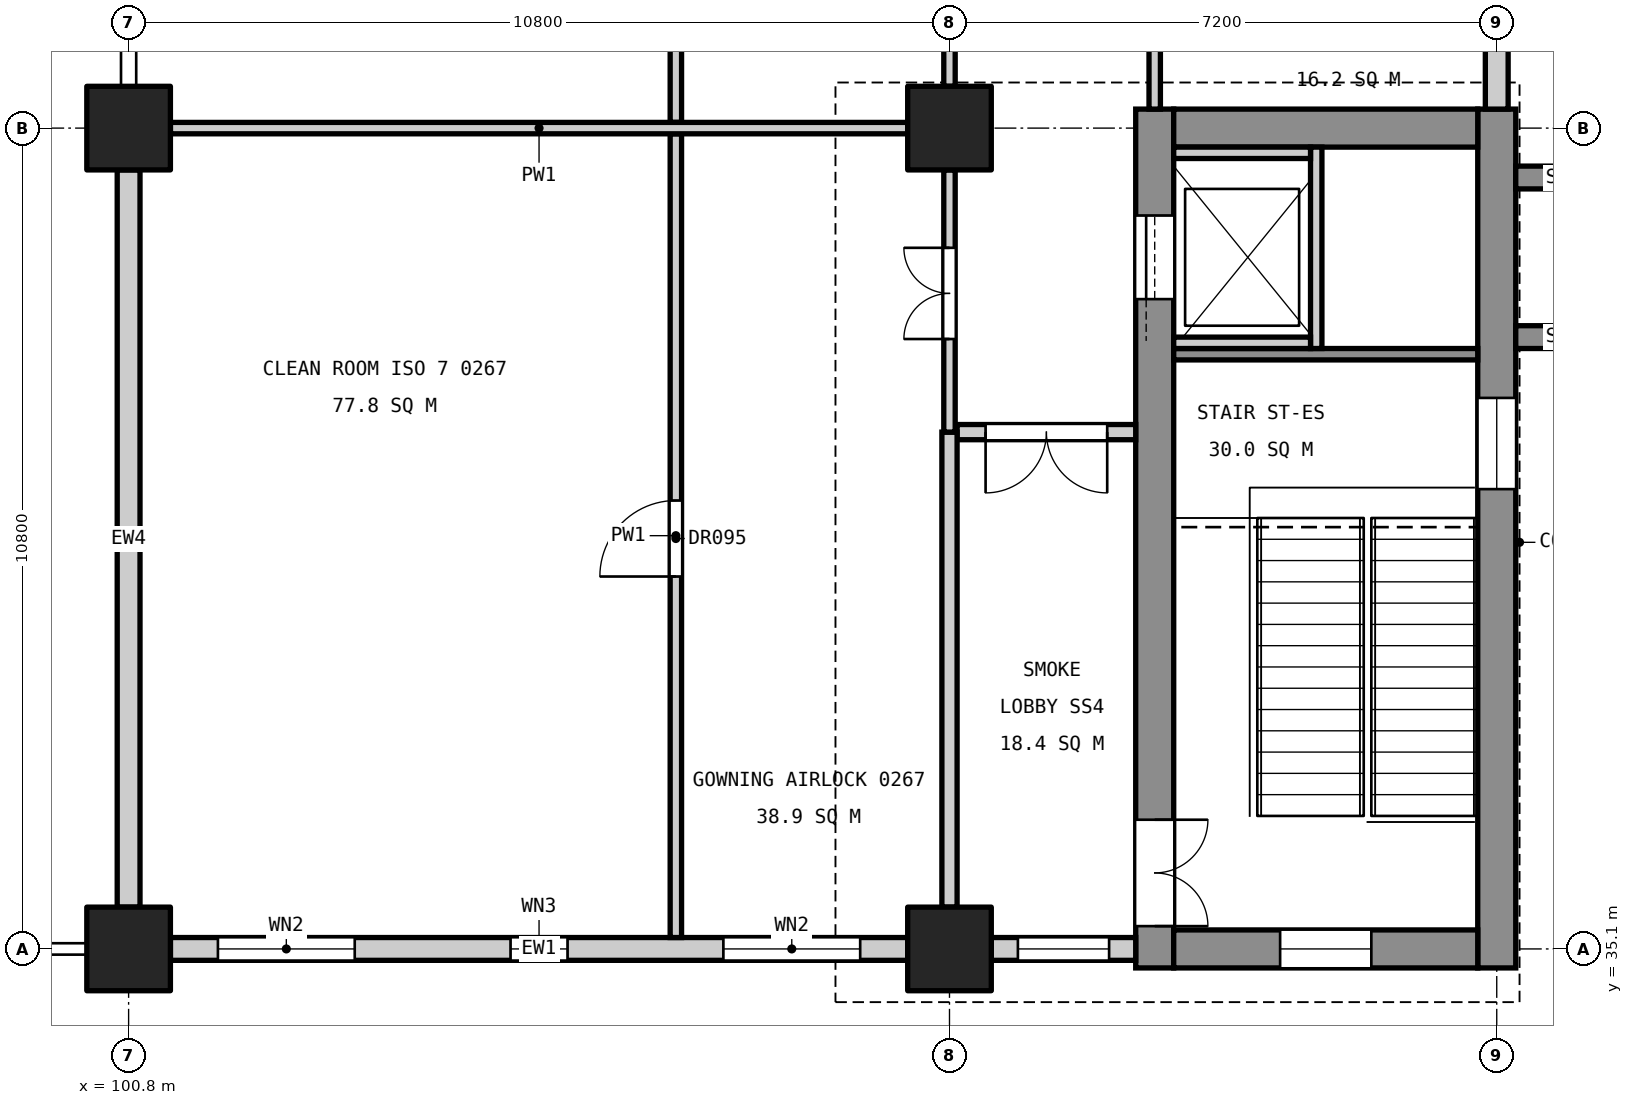
"""IFC4 building model, lengths in metres.
Left out: names, types, materials, properties, quantities, classifications, styles, units other than length and angle.
Written with IfcOpenShell. Run it as: python <this file> out.ifc"""

import sys

from ifc_helpers import new_model, si_unit, direction, frame, frame_2d, origin, origin_2d, place, context, subcontext, project, spatial, rectangle, extrude, element, fill, save


model = new_model("IFC4")
c1 = context("Model", 3, precision=1e-05, world=origin(), true_north=direction((0.0, 1.0)))
c2 = subcontext(c1, "Body", "Model", "MODEL_VIEW")
j1 = project(units=[si_unit("LENGTHUNIT", "METRE"), si_unit("PLANEANGLEUNIT", "RADIAN")], contexts=[c1])
p1 = place(None, origin())
s1 = spatial("IfcSite", under=j1, at=p1, CompositionType="ELEMENT")
p2 = place(p1, origin())
s2 = spatial("IfcBuilding", under=s1, at=p2, CompositionType="ELEMENT")
p3 = place(p2, frame((0.0, 0.0, 11.4)))
s3 = spatial("IfcBuildingStorey", under=s2, at=p3, CompositionType="ELEMENT", Elevation=11.4)
for number, where, z_axis, x_axis in (
    (1, (111.6, 35.1, 0.0), (0.0, 0.0, 1.0), (1.0, 0.0, 0.0)),
    (2, (111.6, 45.9, 0.0), (0.0, 0.0, 1.0), (1.0, 0.0, 0.0)),
    (3, (100.8, 35.1, 0.0), (0.0, 0.0, 1.0), (1.0, 0.0, 0.0)),
    (4, (100.8, 45.9, 0.0), (0.0, 0.0, 1.0), (1.0, 0.0, 0.0)),
):
    element("IfcColumn", number, at=place(p3, frame(where, z_axis=z_axis, x_axis=x_axis)), inside=s3, PredefinedType="COLUMN", context=c2, shape_type="SweptSolid", body=[
        extrude(rectangle(XDim=1.1, YDim=1.1, at=origin_2d()), origin(), (0.0, 0.0, 1.0), 5.4),
    ])
p4 = place(p3, frame((118.8, 34.85, 0.0), z_axis=(0.0, 0.0, 1.0), x_axis=(0.0, 1.0, 0.0)))
e5 = element("IfcWall", 5, at=p4, inside=s3, PredefinedType="SHEAR", context=c2, shape_type="SweptSolid", body=[
    extrude(rectangle(XDim=11.3, YDim=0.5, at=frame_2d((5.65, 0.0))), origin(), (0.0, 0.0, 1.0), 5.1),
])
p5 = place(p4, frame((6.3, 0.0, 3.4)))
e6 = element("IfcOpeningElement", 6, at=p5, cuts=e5, PredefinedType="OPENING", context=c2, shape_type="SweptSolid", body=[
    extrude(rectangle(XDim=1.2, YDim=0.9, at=frame_2d((0.6, 0.45))), frame((0.0, 0.26, 0.0), z_axis=(0.0, -1.0, 0.0), x_axis=(1.0, 0.0, 0.0)), (0.0, 0.0, 1.0), 0.52),
])
p6 = place(p3, frame((114.3, 34.85, 0.0), z_axis=(0.0, 0.0, 1.0), x_axis=(0.0, 1.0, 0.0)))
e7 = element("IfcWall", 7, at=p6, inside=s3, PredefinedType="SHEAR", context=c2, shape_type="SweptSolid", body=[
    extrude(rectangle(XDim=11.3, YDim=0.5, at=frame_2d((5.65, 0.0))), origin(), (0.0, 0.0, 1.0), 5.1),
])
p7 = place(p6, frame((0.55, 0.0, 0.0)))
e8 = element("IfcOpeningElement", 8, at=p7, cuts=e7, PredefinedType="OPENING", context=c2, shape_type="SweptSolid", body=[
    extrude(rectangle(XDim=1.4, YDim=2.1, at=frame_2d((0.7, 1.05))), frame((0.0, 0.26, 0.0), z_axis=(0.0, -1.0, 0.0), x_axis=(1.0, 0.0, 0.0)), (0.0, 0.0, 1.0), 0.52),
])
p8 = place(p6, frame((8.8, 0.0, 0.0)))
e9 = element("IfcOpeningElement", 9, at=p8, cuts=e7, PredefinedType="OPENING", context=c2, shape_type="SweptSolid", body=[
    extrude(rectangle(XDim=1.1, YDim=2.1, at=frame_2d((0.55, 1.05))), frame((0.0, 0.26, 0.0), z_axis=(0.0, -1.0, 0.0), x_axis=(1.0, 0.0, 0.0)), (0.0, 0.0, 1.0), 0.52),
])
p9 = place(p3, frame((118.55, 35.1, 0.0), z_axis=(0.0, 0.0, 1.0), x_axis=(-1.0, 0.0, 0.0)))
e10 = element("IfcWall", 10, at=p9, inside=s3, PredefinedType="SHEAR", context=c2, shape_type="SweptSolid", body=[
    extrude(rectangle(XDim=4.0, YDim=0.5, at=frame_2d((2.0, 0.0))), origin(), (0.0, 0.0, 1.0), 5.1),
])
p10 = place(p9, frame((1.4, 0.0, 3.4)))
e11 = element("IfcOpeningElement", 11, at=p10, cuts=e10, PredefinedType="OPENING", context=c2, shape_type="SweptSolid", body=[
    extrude(rectangle(XDim=1.2, YDim=0.9, at=frame_2d((0.6, 0.45))), frame((0.0, 0.26, 0.0), z_axis=(0.0, -1.0, 0.0), x_axis=(1.0, 0.0, 0.0)), (0.0, 0.0, 1.0), 0.52),
])
p11 = place(p3, frame((118.55, 45.9, 0.0), z_axis=(0.0, 0.0, 1.0), x_axis=(-1.0, 0.0, 0.0)))
e12 = element("IfcWall", 12, at=p11, inside=s3, PredefinedType="SHEAR", context=c2, shape_type="SweptSolid", body=[
    extrude(rectangle(XDim=4.0, YDim=0.5, at=frame_2d((2.0, 0.0))), origin(), (0.0, 0.0, 1.0), 5.1),
])
for number, where, z_axis, x_axis in (
    (13, (119.05, 43.15, 0.0), (0.0, 0.0, 1.0), (1.0, 0.0, 0.0)),
    (14, (119.05, 45.25, 0.0), (0.0, 0.0, 1.0), (1.0, 0.0, 0.0)),
):
    element("IfcWall", number, at=place(p3, frame(where, z_axis=z_axis, x_axis=x_axis)), inside=s3, PredefinedType="SHEAR", context=c2, shape_type="SweptSolid", body=[
        extrude(rectangle(XDim=1.25, YDim=0.3, at=frame_2d((0.625, 0.0))), origin(), (0.0, 0.0, 1.0), 5.4),
    ])
p12 = place(p3, frame((118.55, 42.925, 0.0), z_axis=(0.0, 0.0, 1.0), x_axis=(-1.0, 0.0, 0.0)))
e15 = element("IfcWall", 15, at=p12, inside=s3, PredefinedType="SOLIDWALL", context=c2, shape_type="SweptSolid", body=[
    extrude(rectangle(XDim=4.0, YDim=0.15, at=frame_2d((2.0, 0.0))), origin(), (0.0, 0.0, 1.0), 5.1),
])
p13 = place(p3, frame((116.425, 43.0, 0.0), z_axis=(0.0, 0.0, 1.0), x_axis=(0.0, 1.0, 0.0)))
e16 = element("IfcWall", 16, at=p13, inside=s3, PredefinedType="SOLIDWALL", context=c2, shape_type="SweptSolid", body=[
    extrude(rectangle(XDim=2.65, YDim=0.15, at=frame_2d((1.325, 0.0))), origin(), (0.0, 0.0, 1.0), 5.4),
])
for number, where, z_axis, x_axis in (
    (17, (116.35, 43.075, 0.0), (0.0, 0.0, 1.0), (-1.0, 0.0, 0.0)),
    (18, (116.35, 45.575, 0.0), (0.0, 0.0, 1.0), (-1.0, 0.0, 0.0)),
):
    element("IfcWall", number, at=place(p3, frame(where, z_axis=z_axis, x_axis=x_axis)), inside=s3, PredefinedType="SOLIDWALL", context=c2, shape_type="SweptSolid", body=[
        extrude(rectangle(XDim=1.8, YDim=0.15, at=frame_2d((0.9, 0.0))), origin(), (0.0, 0.0, 1.0), 5.4),
    ])
p14 = place(p3, frame((118.8, 46.15, 0.0), z_axis=(0.0, 0.0, 1.0), x_axis=(0.0, 1.0, 0.0)))
e19 = element("IfcWall", 19, at=p14, inside=s3, PredefinedType="STANDARD", context=c2, shape_type="SweptSolid", body=[
    extrude(rectangle(XDim=10.0, YDim=0.3, at=frame_2d((5.0, 0.0))), origin(), (0.0, 0.0, 1.0), 4.1),
])
p15 = place(p14, frame((1.3, 0.0, 0.8)))
e20 = element("IfcOpeningElement", 20, at=p15, cuts=e19, PredefinedType="OPENING", context=c2, shape_type="SweptSolid", body=[
    extrude(rectangle(XDim=0.75, YDim=1.2, at=frame_2d((0.375, 0.6))), frame((0.0, 0.16, 0.0), z_axis=(0.0, -1.0, 0.0), x_axis=(1.0, 0.0, 0.0)), (0.0, 0.0, 1.0), 0.32),
])
p16 = place(p14, frame((4.25, 0.0, 0.9)))
e21 = element("IfcOpeningElement", 21, at=p16, cuts=e19, PredefinedType="OPENING", context=c2, shape_type="SweptSolid", body=[
    extrude(rectangle(XDim=1.8, YDim=3.0, at=frame_2d((0.9, 1.5))), frame((0.0, 0.16, 0.0), z_axis=(0.0, -1.0, 0.0), x_axis=(1.0, 0.0, 0.0)), (0.0, 0.0, 1.0), 0.32),
])
p17 = place(p14, frame((7.575, 0.0, 0.9)))
e22 = element("IfcOpeningElement", 22, at=p17, cuts=e19, PredefinedType="OPENING", context=c2, shape_type="SweptSolid", body=[
    extrude(rectangle(XDim=1.8, YDim=3.0, at=frame_2d((0.9, 1.5))), frame((0.0, 0.16, 0.0), z_axis=(0.0, -1.0, 0.0), x_axis=(1.0, 0.0, 0.0)), (0.0, 0.0, 1.0), 0.32),
])
p18 = place(p3, frame((114.05, 35.1, 0.0), z_axis=(0.0, 0.0, 1.0), x_axis=(-1.0, 0.0, 0.0)))
e23 = element("IfcWall", 23, at=p18, inside=s3, PredefinedType="STANDARD", context=c2, shape_type="SweptSolid", body=[
    extrude(rectangle(XDim=1.9, YDim=0.3, at=frame_2d((0.95, 0.0))), origin(), (0.0, 0.0, 1.0), 4.3),
])
p19 = place(p18, frame((0.35, 0.0, 0.9)))
e24 = element("IfcOpeningElement", 24, at=p19, cuts=e23, PredefinedType="OPENING", context=c2, shape_type="SweptSolid", body=[
    extrude(rectangle(XDim=1.2, YDim=2.4, at=frame_2d((0.6, 1.2))), frame((0.0, 0.16, 0.0), z_axis=(0.0, -1.0, 0.0), x_axis=(1.0, 0.0, 0.0)), (0.0, 0.0, 1.0), 0.32),
])
p20 = place(p3, frame((111.05, 35.1, 0.0), z_axis=(0.0, 0.0, 1.0), x_axis=(-1.0, 0.0, 0.0)))
e25 = element("IfcWall", 25, at=p20, inside=s3, PredefinedType="STANDARD", context=c2, shape_type="SweptSolid", body=[
    extrude(rectangle(XDim=9.7, YDim=0.3, at=frame_2d((4.85, 0.0))), origin(), (0.0, 0.0, 1.0), 4.3),
])
p21 = place(p20, frame((0.625, 0.0, 0.9)))
e26 = element("IfcOpeningElement", 26, at=p21, cuts=e25, PredefinedType="OPENING", context=c2, shape_type="SweptSolid", body=[
    extrude(rectangle(XDim=1.8, YDim=3.0, at=frame_2d((0.9, 1.5))), frame((0.0, 0.16, 0.0), z_axis=(0.0, -1.0, 0.0), x_axis=(1.0, 0.0, 0.0)), (0.0, 0.0, 1.0), 0.32),
])
p22 = place(p20, frame((4.475, 0.0, 0.8)))
e27 = element("IfcOpeningElement", 27, at=p22, cuts=e25, PredefinedType="OPENING", context=c2, shape_type="SweptSolid", body=[
    extrude(rectangle(XDim=0.75, YDim=1.2, at=frame_2d((0.375, 0.6))), frame((0.0, 0.16, 0.0), z_axis=(0.0, -1.0, 0.0), x_axis=(1.0, 0.0, 0.0)), (0.0, 0.0, 1.0), 0.32),
])
p23 = place(p20, frame((7.275, 0.0, 0.9)))
e28 = element("IfcOpeningElement", 28, at=p23, cuts=e25, PredefinedType="OPENING", context=c2, shape_type="SweptSolid", body=[
    extrude(rectangle(XDim=1.8, YDim=3.0, at=frame_2d((0.9, 1.5))), frame((0.0, 0.16, 0.0), z_axis=(0.0, -1.0, 0.0), x_axis=(1.0, 0.0, 0.0)), (0.0, 0.0, 1.0), 0.32),
])
p24 = place(p3, frame((100.8, 35.65, 0.0), z_axis=(0.0, 0.0, 1.0), x_axis=(0.0, 1.0, 0.0)))
e29 = element("IfcWall", 29, at=p24, inside=s3, PredefinedType="STANDARD", context=c2, shape_type="SweptSolid", body=[
    extrude(rectangle(XDim=9.7, YDim=0.3, at=frame_2d((4.85, 0.0))), origin(), (0.0, 0.0, 1.0), 4.0),
])
p25 = place(p3, frame((114.3, 46.15, 0.0), z_axis=(0.0, 0.0, 1.0), x_axis=(0.0, 1.0, 0.0)))
e30 = element("IfcWall", 30, at=p25, inside=s3, PredefinedType="PARTITIONING", context=c2, shape_type="SweptSolid", body=[
    extrude(rectangle(XDim=10.4, YDim=0.15, at=frame_2d((5.2, 0.0))), origin(), (0.0, 0.0, 1.0), 4.0),
])
p26 = place(p25, frame((4.65, 0.0, 0.0)))
e31 = element("IfcOpeningElement", 31, at=p26, cuts=e30, PredefinedType="OPENING", context=c2, shape_type="SweptSolid", body=[
    extrude(rectangle(XDim=1.0, YDim=2.1, at=frame_2d((0.5, 1.05))), frame((0.0, 0.085, 0.0), z_axis=(0.0, -1.0, 0.0), x_axis=(1.0, 0.0, 0.0)), (0.0, 0.0, 1.0), 0.17),
])
p27 = place(p25, frame((1.05, 0.0, 0.0)))
e32 = element("IfcOpeningElement", 32, at=p27, cuts=e30, PredefinedType="OPENING", context=c2, shape_type="SweptSolid", body=[
    extrude(rectangle(XDim=1.0, YDim=2.1, at=frame_2d((0.5, 1.05))), frame((0.0, 0.085, 0.0), z_axis=(0.0, -1.0, 0.0), x_axis=(1.0, 0.0, 0.0)), (0.0, 0.0, 1.0), 0.17),
])
p28 = place(p25, frame((8.25, 0.0, 0.0)))
e33 = element("IfcOpeningElement", 33, at=p28, cuts=e30, PredefinedType="OPENING", context=c2, shape_type="SweptSolid", body=[
    extrude(rectangle(XDim=1.0, YDim=2.1, at=frame_2d((0.5, 1.05))), frame((0.0, 0.085, 0.0), z_axis=(0.0, -1.0, 0.0), x_axis=(1.0, 0.0, 0.0)), (0.0, 0.0, 1.0), 0.17),
])
p29 = place(p3, frame((114.05, 41.9, 0.0), z_axis=(0.0, 0.0, 1.0), x_axis=(-1.0, 0.0, 0.0)))
e34 = element("IfcWall", 34, at=p29, inside=s3, PredefinedType="PARTITIONING", context=c2, shape_type="SweptSolid", body=[
    extrude(rectangle(XDim=2.35, YDim=0.2, at=frame_2d((1.175, 0.0))), origin(), (0.0, 0.0, 1.0), 4.0),
])
p30 = place(p29, frame((0.375, 0.0, 0.0)))
e35 = element("IfcOpeningElement", 35, at=p30, cuts=e34, PredefinedType="OPENING", context=c2, shape_type="SweptSolid", body=[
    extrude(rectangle(XDim=1.6, YDim=2.1, at=frame_2d((0.8, 1.05))), frame((0.0, 0.11, 0.0), z_axis=(0.0, -1.0, 0.0), x_axis=(1.0, 0.0, 0.0)), (0.0, 0.0, 1.0), 0.22),
])
p31 = place(p3, frame((111.6, 35.65, 0.0), z_axis=(0.0, 0.0, 1.0), x_axis=(0.0, 1.0, 0.0)))
e36 = element("IfcWall", 36, at=p31, inside=s3, PredefinedType="PARTITIONING", context=c2, shape_type="SweptSolid", body=[
    extrude(rectangle(XDim=6.25, YDim=0.2, at=frame_2d((3.125, 0.0))), origin(), (0.0, 0.0, 1.0), 4.0),
])
p32 = place(p3, frame((111.6, 41.9, 0.0), z_axis=(0.0, 0.0, 1.0), x_axis=(0.0, 1.0, 0.0)))
e37 = element("IfcWall", 37, at=p32, inside=s3, PredefinedType="PARTITIONING", context=c2, shape_type="SweptSolid", body=[
    extrude(rectangle(XDim=3.45, YDim=0.15, at=frame_2d((1.725, 0.0))), origin(), (0.0, 0.0, 1.0), 4.0),
])
p33 = place(p32, frame((1.225, 0.0, 0.0)))
e38 = element("IfcOpeningElement", 38, at=p33, cuts=e37, PredefinedType="OPENING", context=c2, shape_type="SweptSolid", body=[
    extrude(rectangle(XDim=1.2, YDim=2.1, at=frame_2d((0.6, 1.05))), frame((0.0, 0.085, 0.0), z_axis=(0.0, -1.0, 0.0), x_axis=(1.0, 0.0, 0.0)), (0.0, 0.0, 1.0), 0.17),
])
p34 = place(p3, frame((111.6, 46.45, 0.0), z_axis=(0.0, 0.0, 1.0), x_axis=(0.0, 1.0, 0.0)))
e39 = element("IfcWall", 39, at=p34, inside=s3, PredefinedType="PARTITIONING", context=c2, shape_type="SweptSolid", body=[
    extrude(rectangle(XDim=9.7, YDim=0.15, at=frame_2d((4.85, 0.0))), origin(), (0.0, 0.0, 1.0), 4.0),
])
p35 = place(p34, frame((1.025, 0.0, 0.0)))
e40 = element("IfcOpeningElement", 40, at=p35, cuts=e39, PredefinedType="OPENING", context=c2, shape_type="SweptSolid", body=[
    extrude(rectangle(XDim=1.2, YDim=2.1, at=frame_2d((0.6, 1.05))), frame((0.0, 0.085, 0.0), z_axis=(0.0, -1.0, 0.0), x_axis=(1.0, 0.0, 0.0)), (0.0, 0.0, 1.0), 0.17),
])
p36 = place(p34, frame((7.675, 0.0, 0.0)))
e41 = element("IfcOpeningElement", 41, at=p36, cuts=e39, PredefinedType="OPENING", context=c2, shape_type="SweptSolid", body=[
    extrude(rectangle(XDim=1.2, YDim=2.1, at=frame_2d((0.6, 1.05))), frame((0.0, 0.085, 0.0), z_axis=(0.0, -1.0, 0.0), x_axis=(1.0, 0.0, 0.0)), (0.0, 0.0, 1.0), 0.17),
])
p37 = place(p34, frame((4.25, 0.0, 0.0)))
e42 = element("IfcOpeningElement", 42, at=p37, cuts=e39, PredefinedType="OPENING", context=c2, shape_type="SweptSolid", body=[
    extrude(rectangle(XDim=1.2, YDim=2.1, at=frame_2d((0.6, 1.05))), frame((0.0, 0.085, 0.0), z_axis=(0.0, -1.0, 0.0), x_axis=(1.0, 0.0, 0.0)), (0.0, 0.0, 1.0), 0.17),
])
p38 = place(p3, frame((108.0, 35.25, 0.0), z_axis=(0.0, 0.0, 1.0), x_axis=(0.0, 1.0, 0.0)))
e43 = element("IfcWall", 43, at=p38, inside=s3, PredefinedType="PARTITIONING", context=c2, shape_type="SweptSolid", body=[
    extrude(rectangle(XDim=10.575, YDim=0.15, at=frame_2d((5.288, 0.0))), origin(), (0.0, 0.0, 1.0), 4.0),
])
p39 = place(p38, frame((4.75, 0.0, 0.0)))
e44 = element("IfcOpeningElement", 44, at=p39, cuts=e43, PredefinedType="OPENING", context=c2, shape_type="SweptSolid", body=[
    extrude(rectangle(XDim=1.0, YDim=2.1, at=frame_2d((0.5, 1.05))), frame((0.0, 0.085, 0.0), z_axis=(0.0, -1.0, 0.0), x_axis=(1.0, 0.0, 0.0)), (0.0, 0.0, 1.0), 0.17),
])
p40 = place(p3, frame((108.0, 45.975, 0.0), z_axis=(0.0, 0.0, 1.0), x_axis=(0.0, 1.0, 0.0)))
e45 = element("IfcWall", 45, at=p40, inside=s3, PredefinedType="PARTITIONING", context=c2, shape_type="SweptSolid", body=[
    extrude(rectangle(XDim=3.45, YDim=0.15, at=frame_2d((1.725, 0.0))), origin(), (0.0, 0.0, 1.0), 4.0),
])
p41 = place(p40, frame((1.225, 0.0, 0.0)))
e46 = element("IfcOpeningElement", 46, at=p41, cuts=e45, PredefinedType="OPENING", context=c2, shape_type="SweptSolid", body=[
    extrude(rectangle(XDim=1.0, YDim=2.1, at=frame_2d((0.5, 1.05))), frame((0.0, 0.085, 0.0), z_axis=(0.0, -1.0, 0.0), x_axis=(1.0, 0.0, 0.0)), (0.0, 0.0, 1.0), 0.17),
])
p42 = place(p3, frame((111.05, 45.9, 0.0), z_axis=(0.0, 0.0, 1.0), x_axis=(-1.0, 0.0, 0.0)))
e47 = element("IfcWall", 47, at=p42, inside=s3, PredefinedType="PARTITIONING", context=c2, shape_type="SweptSolid", body=[
    extrude(rectangle(XDim=9.7, YDim=0.15, at=frame_2d((4.85, 0.0))), origin(), (0.0, 0.0, 1.0), 4.3),
])
p43 = place(p7, frame((1.4, 0.0, 0.0), z_axis=(0.0, 0.0, 1.0), x_axis=(-1.0, 0.0, 0.0)))
e48 = element("IfcDoor", 48, at=p43, inside=s3, OperationType="DOUBLE_DOOR_SINGLE_SWING", PredefinedType="DOOR", context=c2, shape_type="SweptSolid", body=[
    extrude(rectangle(XDim=1.4, YDim=2.1, at=frame_2d((0.7, 1.05))), frame((0.0, 0.025, 0.0), z_axis=(0.0, -1.0, 0.0), x_axis=(1.0, 0.0, 0.0)), (0.0, 0.0, 1.0), 0.05),
])
fill(e8, e48)
p44 = place(p8, origin())
e49 = element("IfcDoor", 49, at=p44, inside=s3, OperationType="SLIDING_TO_LEFT", PredefinedType="DOOR", context=c2, shape_type="SweptSolid", body=[
    extrude(rectangle(XDim=1.1, YDim=2.1, at=frame_2d((0.55, 1.05))), frame((0.0, 0.025, 0.0), z_axis=(0.0, -1.0, 0.0), x_axis=(1.0, 0.0, 0.0)), (0.0, 0.0, 1.0), 0.05),
])
fill(e9, e49)
p45 = place(p19, origin())
e50 = element("IfcWindow", 50, at=p45, inside=s3, PartitioningType="SINGLE_PANEL", PredefinedType="WINDOW", context=c2, shape_type="SweptSolid", body=[
    extrude(rectangle(XDim=1.2, YDim=2.4, at=frame_2d((0.6, 1.2))), frame((0.0, 0.03, 0.0), z_axis=(0.0, -1.0, 0.0), x_axis=(1.0, 0.0, 0.0)), (0.0, 0.0, 1.0), 0.06),
])
fill(e24, e50)
p46 = place(p21, origin())
e51 = element("IfcWindow", 51, at=p46, inside=s3, PartitioningType="SINGLE_PANEL", PredefinedType="WINDOW", context=c2, shape_type="SweptSolid", body=[
    extrude(rectangle(XDim=1.8, YDim=3.0, at=frame_2d((0.9, 1.5))), frame((0.0, 0.03, 0.0), z_axis=(0.0, -1.0, 0.0), x_axis=(1.0, 0.0, 0.0)), (0.0, 0.0, 1.0), 0.06),
])
fill(e26, e51)
p47 = place(p22, origin())
e52 = element("IfcWindow", 52, at=p47, inside=s3, PartitioningType="SINGLE_PANEL", PredefinedType="WINDOW", context=c2, shape_type="SweptSolid", body=[
    extrude(rectangle(XDim=0.75, YDim=1.2, at=frame_2d((0.375, 0.6))), frame((0.0, 0.03, 0.0), z_axis=(0.0, -1.0, 0.0), x_axis=(1.0, 0.0, 0.0)), (0.0, 0.0, 1.0), 0.06),
])
fill(e27, e52)
p48 = place(p23, origin())
e53 = element("IfcWindow", 53, at=p48, inside=s3, PartitioningType="SINGLE_PANEL", PredefinedType="WINDOW", context=c2, shape_type="SweptSolid", body=[
    extrude(rectangle(XDim=1.8, YDim=3.0, at=frame_2d((0.9, 1.5))), frame((0.0, 0.03, 0.0), z_axis=(0.0, -1.0, 0.0), x_axis=(1.0, 0.0, 0.0)), (0.0, 0.0, 1.0), 0.06),
])
fill(e28, e53)
p49 = place(p5, origin())
e54 = element("IfcWindow", 54, at=p49, inside=s3, PartitioningType="SINGLE_PANEL", PredefinedType="WINDOW", context=c2, shape_type="SweptSolid", body=[
    extrude(rectangle(XDim=1.2, YDim=0.9, at=frame_2d((0.6, 0.45))), frame((0.0, 0.03, 0.0), z_axis=(0.0, -1.0, 0.0), x_axis=(1.0, 0.0, 0.0)), (0.0, 0.0, 1.0), 0.06),
])
fill(e6, e54)
p50 = place(p10, origin())
e55 = element("IfcWindow", 55, at=p50, inside=s3, PartitioningType="SINGLE_PANEL", PredefinedType="WINDOW", context=c2, shape_type="SweptSolid", body=[
    extrude(rectangle(XDim=1.2, YDim=0.9, at=frame_2d((0.6, 0.45))), frame((0.0, 0.03, 0.0), z_axis=(0.0, -1.0, 0.0), x_axis=(1.0, 0.0, 0.0)), (0.0, 0.0, 1.0), 0.06),
])
fill(e11, e55)
p51 = place(p39, origin())
e56 = element("IfcDoor", 56, at=p51, inside=s3, OperationType="SINGLE_SWING_LEFT", PredefinedType="DOOR", context=c2, shape_type="SweptSolid", body=[
    extrude(rectangle(XDim=1.0, YDim=2.1, at=frame_2d((0.5, 1.05))), frame((0.0, 0.025, 0.0), z_axis=(0.0, -1.0, 0.0), x_axis=(1.0, 0.0, 0.0)), (0.0, 0.0, 1.0), 0.05),
])
fill(e44, e56)
p52 = place(p33, origin())
e57 = element("IfcDoor", 57, at=p52, inside=s3, OperationType="DOUBLE_DOOR_SINGLE_SWING", PredefinedType="DOOR", context=c2, shape_type="SweptSolid", body=[
    extrude(rectangle(XDim=1.2, YDim=2.1, at=frame_2d((0.6, 1.05))), frame((0.0, 0.025, 0.0), z_axis=(0.0, -1.0, 0.0), x_axis=(1.0, 0.0, 0.0)), (0.0, 0.0, 1.0), 0.05),
])
fill(e38, e57)
p53 = place(p30, origin())
e58 = element("IfcDoor", 58, at=p53, inside=s3, OperationType="DOUBLE_DOOR_SINGLE_SWING", PredefinedType="DOOR", context=c2, shape_type="SweptSolid", body=[
    extrude(rectangle(XDim=1.6, YDim=2.1, at=frame_2d((0.8, 1.05))), frame((0.0, 0.025, 0.0), z_axis=(0.0, -1.0, 0.0), x_axis=(1.0, 0.0, 0.0)), (0.0, 0.0, 1.0), 0.05),
])
fill(e35, e58)
save(model, sys.argv[1])
